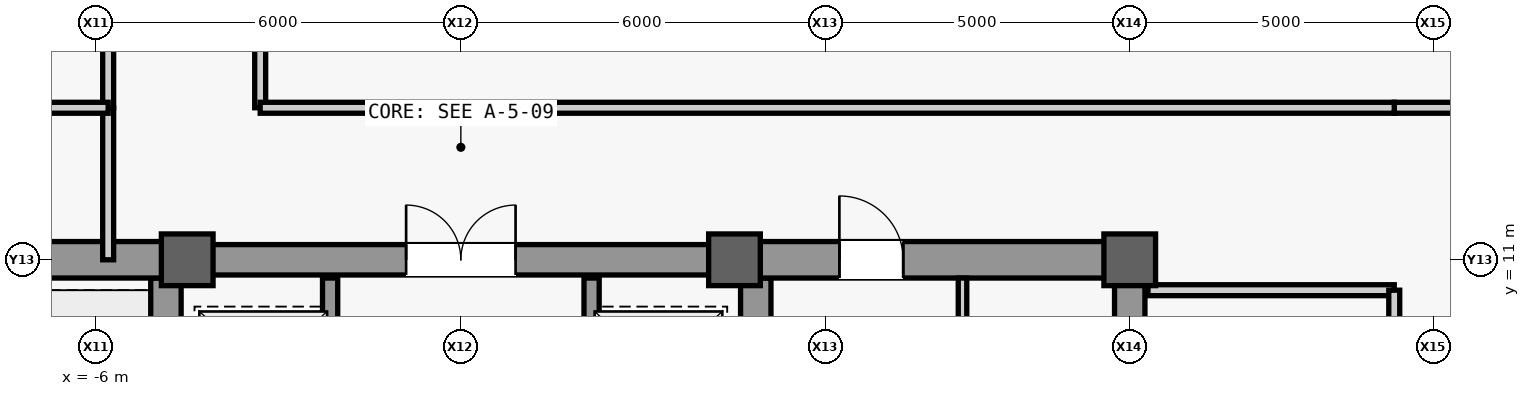
"""IFC4 building model, lengths in metres.
Left out: names, types, materials, properties, quantities, classifications, styles, units other than length and angle.
Written with IfcOpenShell. Run it as: python <this file> out.ifc"""

import sys

from ifc_helpers import new_model, si_unit, direction, frame, frame_2d, origin, origin_2d, place, context, subcontext, project, spatial, rectangle, extrude, source, transform, mapped, element, fill, save


model = new_model("IFC4")
c1 = context("Model", 3, precision=1e-05, world=origin(), true_north=direction((0.0, 1.0)))
c2 = subcontext(c1, "Body", "Model", "MODEL_VIEW")
j1 = project(units=[si_unit("LENGTHUNIT", "METRE"), si_unit("PLANEANGLEUNIT", "RADIAN")], contexts=[c1])
p1 = place(None, origin())
s1 = spatial("IfcSite", under=j1, at=p1, CompositionType="ELEMENT")
p2 = place(p1, origin())
s2 = spatial("IfcBuilding", under=s1, at=p2, CompositionType="ELEMENT")
p3 = place(p2, frame((0.0, 0.0, 235.1)))
s3 = spatial("IfcBuildingStorey", under=s2, at=p3, CompositionType="ELEMENT", Elevation=235.1)
m1 = source(origin(), c2, "Body", "SweptSolid", [
    extrude(rectangle(XDim=22.0, YDim=0.5, at=frame_2d((11.0, 0.0))), origin(), (0.0, 0.0, 1.0), 3.78),
])
p4 = place(p3, frame((11.0, -11.0, 0.0), z_axis=(0.0, 0.0, 1.0), x_axis=(0.0, 1.0, 0.0)))
e1 = element("IfcWall", 1, at=p4, inside=s3, PredefinedType="SHEAR", context=c2, shape_type="MappedRepresentation", body=[
    mapped(m1, transform((0.0, 0.0, 0.0), scale=1.0)),
])
m2 = source(origin(), c2, "Body", "SweptSolid", [
    extrude(rectangle(XDim=1.1, YDim=2.2, at=frame_2d((0.55, 1.1))), frame((0.0, 0.26, 0.0), z_axis=(0.0, -1.0, 0.0), x_axis=(1.0, 0.0, 0.0)), (0.0, 0.0, 1.0), 0.52),
])
p5 = place(p4, frame((0.8, 0.0, 0.0)))
e2 = element("IfcOpeningElement", 2, at=p5, cuts=e1, PredefinedType="OPENING", context=c2, shape_type="MappedRepresentation", body=[
    mapped(m2, transform((0.0, 0.0, 0.0), scale=1.0)),
])
m3 = source(origin(), c2, "Body", "SweptSolid", [
    extrude(rectangle(XDim=0.9, YDim=2.15, at=frame_2d((0.45, 1.075))), frame((0.0, 0.26, 0.0), z_axis=(0.0, -1.0, 0.0), x_axis=(1.0, 0.0, 0.0)), (0.0, 0.0, 1.0), 0.52),
])
p6 = place(p4, frame((6.2, 0.0, 0.0)))
e3 = element("IfcOpeningElement", 3, at=p6, cuts=e1, PredefinedType="OPENING", context=c2, shape_type="MappedRepresentation", body=[
    mapped(m3, transform((0.0, 0.0, 0.0), scale=1.0)),
])
p7 = place(p4, frame((8.525, 0.0, 0.0)))
e4 = element("IfcOpeningElement", 4, at=p7, cuts=e1, PredefinedType="OPENING", context=c2, shape_type="MappedRepresentation", body=[
    mapped(m3, transform((0.0, 0.0, 0.0), scale=1.0)),
])
m4 = source(origin(), c2, "Body", "SweptSolid", [
    extrude(rectangle(XDim=1.3, YDim=2.3, at=frame_2d((0.65, 1.15))), frame((0.0, 0.26, 0.0), z_axis=(0.0, -1.0, 0.0), x_axis=(1.0, 0.0, 0.0)), (0.0, 0.0, 1.0), 0.52),
])
p8 = place(p4, frame((2.7, 0.0, 0.0)))
e5 = element("IfcOpeningElement", 5, at=p8, cuts=e1, PredefinedType="OPENING", context=c2, shape_type="MappedRepresentation", body=[
    mapped(m4, transform((0.0, 0.0, 0.0), scale=1.0)),
])
p9 = place(p4, frame((13.35, 0.0, 0.0)))
e6 = element("IfcOpeningElement", 6, at=p9, cuts=e1, PredefinedType="OPENING", context=c2, shape_type="MappedRepresentation", body=[
    mapped(m4, transform((0.0, 0.0, 0.0), scale=1.0)),
])
m5 = source(origin(), c2, "Body", "SweptSolid", [
    extrude(rectangle(XDim=21.4, YDim=0.5, at=frame_2d((10.7, 0.0))), origin(), (0.0, 0.0, 1.0), 3.78),
])
for number, where, z_axis, x_axis in (
    (7, (-4.85, -10.7, 0.0), (0.0, 0.0, 1.0), (0.0, 1.0, 0.0)),
    (8, (4.85, -10.7, 0.0), (0.0, 0.0, 1.0), (0.0, 1.0, 0.0)),
):
    element("IfcWall", number, at=place(p3, frame(where, z_axis=z_axis, x_axis=x_axis)), inside=s3, PredefinedType="SHEAR", context=c2, shape_type="MappedRepresentation", body=[
        mapped(m5, transform((0.0, 0.0, 0.0), scale=1.0)),
    ])
m6 = source(origin(), c2, "Body", "SweptSolid", [
    extrude(rectangle(XDim=5.9, YDim=0.6, at=frame_2d((2.95, 0.0))), origin(), (0.0, 0.0, 1.0), 3.78),
])
p10 = place(p3, frame((-10.75, 11.0, 0.0), z_axis=(0.0, 0.0, 1.0), x_axis=(1.0, 0.0, 0.0)))
e9 = element("IfcWall", 9, at=p10, inside=s3, PredefinedType="SHEAR", context=c2, shape_type="MappedRepresentation", body=[
    mapped(m6, transform((0.0, 0.0, 0.0), scale=1.0)),
])
p11 = place(p3, frame((4.85, 11.0, 0.0), z_axis=(0.0, 0.0, 1.0), x_axis=(1.0, 0.0, 0.0)))
e10 = element("IfcWall", 10, at=p11, inside=s3, PredefinedType="SHEAR", context=c2, shape_type="MappedRepresentation", body=[
    mapped(m6, transform((0.0, 0.0, 0.0), scale=1.0)),
])
m7 = source(origin(), c2, "Body", "SweptSolid", [
    extrude(rectangle(XDim=1.05, YDim=2.2, at=frame_2d((0.525, 1.1))), frame((0.0, 0.31, 0.0), z_axis=(0.0, -1.0, 0.0), x_axis=(1.0, 0.0, 0.0)), (0.0, 0.0, 1.0), 0.62),
])
p12 = place(p11, frame((1.375, 0.0, 0.0)))
e11 = element("IfcOpeningElement", 11, at=p12, cuts=e10, PredefinedType="OPENING", context=c2, shape_type="MappedRepresentation", body=[
    mapped(m7, transform((0.0, 0.0, 0.0), scale=1.0)),
])
m8 = source(origin(), c2, "Body", "SweptSolid", [
    extrude(rectangle(XDim=9.2, YDim=0.5, at=frame_2d((4.6, 0.0))), origin(), (0.0, 0.0, 1.0), 3.78),
])
p13 = place(p3, frame((-4.6, 11.0, 0.0), z_axis=(0.0, 0.0, 1.0), x_axis=(1.0, 0.0, 0.0)))
e12 = element("IfcWall", 12, at=p13, inside=s3, PredefinedType="SHEAR", context=c2, shape_type="MappedRepresentation", body=[
    mapped(m8, transform((0.0, 0.0, 0.0), scale=1.0)),
])
m9 = source(origin(), c2, "Body", "SweptSolid", [
    extrude(rectangle(XDim=1.8, YDim=2.25, at=frame_2d((0.9, 1.125))), frame((0.0, 0.26, 0.0), z_axis=(0.0, -1.0, 0.0), x_axis=(1.0, 0.0, 0.0)), (0.0, 0.0, 1.0), 0.52),
])
p14 = place(p13, frame((3.7, 0.0, 0.0)))
e13 = element("IfcOpeningElement", 13, at=p14, cuts=e12, PredefinedType="OPENING", context=c2, shape_type="MappedRepresentation", body=[
    mapped(m9, transform((0.0, 0.0, 0.0), scale=1.0)),
])
m10 = source(origin(), c2, "Body", "SweptSolid", [
    extrude(rectangle(XDim=0.85, YDim=0.85, at=origin_2d()), origin(), (0.0, 0.0, 1.0), 4.0),
])
for number, where, z_axis, x_axis in (
    (14, (-4.5, 11.0, 0.0), (0.0, 0.0, 1.0), (1.0, 0.0, 0.0)),
    (15, (4.5, 11.0, 0.0), (0.0, 0.0, 1.0), (1.0, 0.0, 0.0)),
    (16, (11.0, 11.0, 0.0), (0.0, 0.0, 1.0), (1.0, 0.0, 0.0)),
):
    element("IfcColumn", number, at=place(p3, frame(where, z_axis=z_axis, x_axis=x_axis)), inside=s3, PredefinedType="COLUMN", context=c2, shape_type="MappedRepresentation", body=[
        mapped(m10, transform((0.0, 0.0, 0.0), scale=1.0)),
    ])
m11 = source(origin(), c2, "Body", "SweptSolid", [
    extrude(rectangle(XDim=9.4, YDim=0.14, at=frame_2d((4.7, 0.0))), origin(), (0.0, 0.0, 1.0), 3.78),
])
p15 = place(p3, frame((8.25, 1.3, 0.0), z_axis=(0.0, 0.0, 1.0), x_axis=(0.0, 1.0, 0.0)))
e17 = element("IfcWall", 17, at=p15, inside=s3, PredefinedType="PARTITIONING", context=c2, shape_type="MappedRepresentation", body=[
    mapped(m11, transform((0.0, 0.0, 0.0), scale=1.0)),
])
m12 = source(origin(), c2, "Body", "SweptSolid", [
    extrude(rectangle(XDim=4.05, YDim=0.18, at=frame_2d((2.025, 0.0))), origin(), (0.0, 0.0, 1.0), 3.78),
])
p16 = place(p3, frame((11.3, 10.5, 0.0), z_axis=(0.0, 0.0, 1.0), x_axis=(1.0, 0.0, 0.0)))
e18 = element("IfcWall", 18, at=p16, inside=s3, PredefinedType="PARTITIONING", context=c2, shape_type="MappedRepresentation", body=[
    mapped(m12, transform((0.0, 0.0, 0.0), scale=1.0)),
])
m13 = source(origin(), c2, "Body", "SweptSolid", [
    extrude(rectangle(XDim=16.6, YDim=0.18, at=frame_2d((8.3, 0.0))), origin(), (0.0, 0.0, 1.0), 3.78),
])
p17 = place(p3, frame((15.35, -6.1, 0.0), z_axis=(0.0, 0.0, 1.0), x_axis=(0.0, 1.0, 0.0)))
e19 = element("IfcWall", 19, at=p17, inside=s3, PredefinedType="PARTITIONING", context=c2, shape_type="MappedRepresentation", body=[
    mapped(m13, transform((0.0, 0.0, 0.0), scale=1.0)),
])
m14 = source(origin(), c2, "Body", "SweptSolid", [
    extrude(rectangle(XDim=1.8, YDim=2.25, at=frame_2d((0.9, 1.125))), frame((0.0, 0.1, 0.0), z_axis=(0.0, -1.0, 0.0), x_axis=(1.0, 0.0, 0.0)), (0.0, 0.0, 1.0), 0.2),
])
p18 = place(p17, frame((2.7, 0.0, 0.0)))
e20 = element("IfcOpeningElement", 20, at=p18, cuts=e19, PredefinedType="OPENING", context=c2, shape_type="MappedRepresentation", body=[
    mapped(m14, transform((0.0, 0.0, 0.0), scale=1.0)),
])
p19 = place(p17, frame((13.0, 0.0, 0.0)))
e21 = element("IfcOpeningElement", 21, at=p19, cuts=e19, PredefinedType="OPENING", context=c2, shape_type="MappedRepresentation", body=[
    mapped(m14, transform((0.0, 0.0, 0.0), scale=1.0)),
])
m15 = source(origin(), c2, "Body", "SweptSolid", [
    extrude(rectangle(XDim=5.4, YDim=0.25, at=frame_2d((2.7, 0.0))), origin(), (0.0, 0.0, 1.0), 3.78),
])
p20 = place(p3, frame((-2.15, 5.3, 0.0), z_axis=(0.0, 0.0, 1.0), x_axis=(0.0, 1.0, 0.0)))
e22 = element("IfcWall", 22, at=p20, inside=s3, PredefinedType="SHEAR", context=c2, shape_type="MappedRepresentation", body=[
    mapped(m15, transform((0.0, 0.0, 0.0), scale=1.0)),
])
m16 = source(origin(), c2, "Body", "SweptSolid", [
    extrude(rectangle(XDim=1.2, YDim=2.3, at=frame_2d((0.6, 1.15))), frame((0.0, 0.135, 0.0), z_axis=(0.0, -1.0, 0.0), x_axis=(1.0, 0.0, 0.0)), (0.0, 0.0, 1.0), 0.27),
])
p21 = place(p20, frame((3.3, 0.0, 0.0)))
e23 = element("IfcOpeningElement", 23, at=p21, cuts=e22, PredefinedType="OPENING", context=c2, shape_type="MappedRepresentation", body=[
    mapped(m16, transform((0.0, 0.0, 0.0), scale=1.0)),
])
p22 = place(p20, frame((0.9, 0.0, 0.0)))
e24 = element("IfcOpeningElement", 24, at=p22, cuts=e22, PredefinedType="OPENING", context=c2, shape_type="MappedRepresentation", body=[
    mapped(m16, transform((0.0, 0.0, 0.0), scale=1.0)),
])
p23 = place(p3, frame((2.15, 5.3, 0.0), z_axis=(0.0, 0.0, 1.0), x_axis=(0.0, 1.0, 0.0)))
e25 = element("IfcWall", 25, at=p23, inside=s3, PredefinedType="SHEAR", context=c2, shape_type="MappedRepresentation", body=[
    mapped(m15, transform((0.0, 0.0, 0.0), scale=1.0)),
])
p24 = place(p23, frame((3.3, 0.0, 0.0)))
e26 = element("IfcOpeningElement", 26, at=p24, cuts=e25, PredefinedType="OPENING", context=c2, shape_type="MappedRepresentation", body=[
    mapped(m16, transform((0.0, 0.0, 0.0), scale=1.0)),
])
p25 = place(p23, frame((0.9, 0.0, 0.0)))
e27 = element("IfcOpeningElement", 27, at=p25, cuts=e25, PredefinedType="OPENING", context=c2, shape_type="MappedRepresentation", body=[
    mapped(m16, transform((0.0, 0.0, 0.0), scale=1.0)),
])
m17 = source(origin(), c2, "Body", "SweptSolid", [
    extrude(rectangle(XDim=2.45, YDim=0.18, at=frame_2d((1.225, 0.0))), origin(), (0.0, 0.0, 1.0), 3.78),
])
p26 = place(p3, frame((15.35, 13.5, 0.0), z_axis=(0.0, 0.0, 1.0), x_axis=(1.0, 0.0, 0.0)))
e28 = element("IfcWall", 28, at=p26, inside=s3, PredefinedType="PARTITIONING", context=c2, shape_type="MappedRepresentation", body=[
    mapped(m17, transform((0.0, 0.0, 0.0), scale=1.0)),
])
m18 = source(origin(), c2, "Body", "SweptSolid", [
    extrude(rectangle(XDim=2.5, YDim=0.18, at=frame_2d((1.25, 0.0))), origin(), (0.0, 0.0, 1.0), 3.085),
])
p27 = place(p3, frame((-5.8, 11.0, 0.0), z_axis=(0.0, 0.0, 1.0), x_axis=(0.0, 1.0, 0.0)))
e29 = element("IfcWall", 29, at=p27, inside=s3, PredefinedType="PARTITIONING", context=c2, shape_type="MappedRepresentation", body=[
    mapped(m18, transform((0.0, 0.0, 0.0), scale=1.0)),
])
m19 = source(origin(), c2, "Body", "SweptSolid", [
    extrude(rectangle(XDim=16.5, YDim=0.18, at=frame_2d((8.25, 0.0))), origin(), (0.0, 0.0, 1.0), 3.085),
])
p28 = place(p3, frame((-5.8, 13.5, 0.0), z_axis=(0.0, 0.0, 1.0), x_axis=(0.0, 1.0, 0.0)))
e30 = element("IfcWall", 30, at=p28, inside=s3, PredefinedType="PARTITIONING", context=c2, shape_type="MappedRepresentation", body=[
    mapped(m19, transform((0.0, 0.0, 0.0), scale=1.0)),
])
m20 = source(origin(), c2, "Body", "SweptSolid", [
    extrude(rectangle(XDim=1.05, YDim=2.2, at=frame_2d((0.525, 1.1))), frame((0.0, 0.1, 0.0), z_axis=(0.0, -1.0, 0.0), x_axis=(1.0, 0.0, 0.0)), (0.0, 0.0, 1.0), 0.2),
])
p29 = place(p28, frame((11.85, 0.0, 0.0)))
e31 = element("IfcOpeningElement", 31, at=p29, cuts=e30, PredefinedType="OPENING", context=c2, shape_type="MappedRepresentation", body=[
    mapped(m20, transform((0.0, 0.0, 0.0), scale=1.0)),
])
m21 = source(origin(), c2, "Body", "SweptSolid", [
    extrude(rectangle(XDim=9.55, YDim=0.18, at=frame_2d((4.775, 0.0))), origin(), (0.0, 0.0, 1.0), 3.78),
])
p30 = place(p3, frame((-15.35, 13.5, 0.0), z_axis=(0.0, 0.0, 1.0), x_axis=(1.0, 0.0, 0.0)))
e32 = element("IfcWall", 32, at=p30, inside=s3, PredefinedType="PARTITIONING", context=c2, shape_type="MappedRepresentation", body=[
    mapped(m21, transform((0.0, 0.0, 0.0), scale=1.0)),
])
m22 = source(origin(), c2, "Body", "SweptSolid", [
    extrude(rectangle(XDim=16.5, YDim=0.18, at=frame_2d((8.25, 0.0))), origin(), (0.0, 0.0, 1.0), 3.78),
])
p31 = place(p3, frame((-3.3, 13.5, 0.0), z_axis=(0.0, 0.0, 1.0), x_axis=(0.0, 1.0, 0.0)))
e33 = element("IfcWall", 33, at=p31, inside=s3, PredefinedType="PARTITIONING", context=c2, shape_type="MappedRepresentation", body=[
    mapped(m22, transform((0.0, 0.0, 0.0), scale=1.0)),
])
p32 = place(p31, frame((11.85, 0.0, 0.0)))
e34 = element("IfcOpeningElement", 34, at=p32, cuts=e33, PredefinedType="OPENING", context=c2, shape_type="MappedRepresentation", body=[
    mapped(m20, transform((0.0, 0.0, 0.0), scale=1.0)),
])
m23 = source(origin(), c2, "Body", "SweptSolid", [
    extrude(rectangle(XDim=18.65, YDim=0.18, at=frame_2d((9.325, 0.0))), origin(), (0.0, 0.0, 1.0), 3.78),
])
p33 = place(p3, frame((-3.3, 13.5, 0.0), z_axis=(0.0, 0.0, 1.0), x_axis=(1.0, 0.0, 0.0)))
e35 = element("IfcWall", 35, at=p33, inside=s3, PredefinedType="PARTITIONING", context=c2, shape_type="MappedRepresentation", body=[
    mapped(m23, transform((0.0, 0.0, 0.0), scale=1.0)),
])
m24 = source(origin(), c2, "Body", "SweptSolid", [
    extrude(rectangle(XDim=1.05, YDim=2.2, at=frame_2d((0.525, 1.1))), frame((0.0, 0.025, 0.0), z_axis=(0.0, -1.0, 0.0), x_axis=(1.0, 0.0, 0.0)), (0.0, 0.0, 1.0), 0.05),
])
p34 = place(p12, origin())
e36 = element("IfcDoor", 36, at=p34, inside=s3, OperationType="SINGLE_SWING_LEFT", PredefinedType="DOOR", context=c2, shape_type="MappedRepresentation", body=[
    mapped(m24, transform((0.0, 0.0, 0.0), scale=1.0)),
])
fill(e11, e36)
m25 = source(origin(), c2, "Body", "SweptSolid", [
    extrude(rectangle(XDim=1.8, YDim=2.25, at=frame_2d((0.9, 1.125))), frame((0.0, 0.025, 0.0), z_axis=(0.0, -1.0, 0.0), x_axis=(1.0, 0.0, 0.0)), (0.0, 0.0, 1.0), 0.05),
])
p35 = place(p14, origin())
e37 = element("IfcDoor", 37, at=p35, inside=s3, OperationType="SINGLE_SWING_RIGHT", PredefinedType="DOOR", context=c2, shape_type="MappedRepresentation", body=[
    mapped(m25, transform((0.0, 0.0, 0.0), scale=1.0)),
])
fill(e13, e37)
save(model, sys.argv[1])
